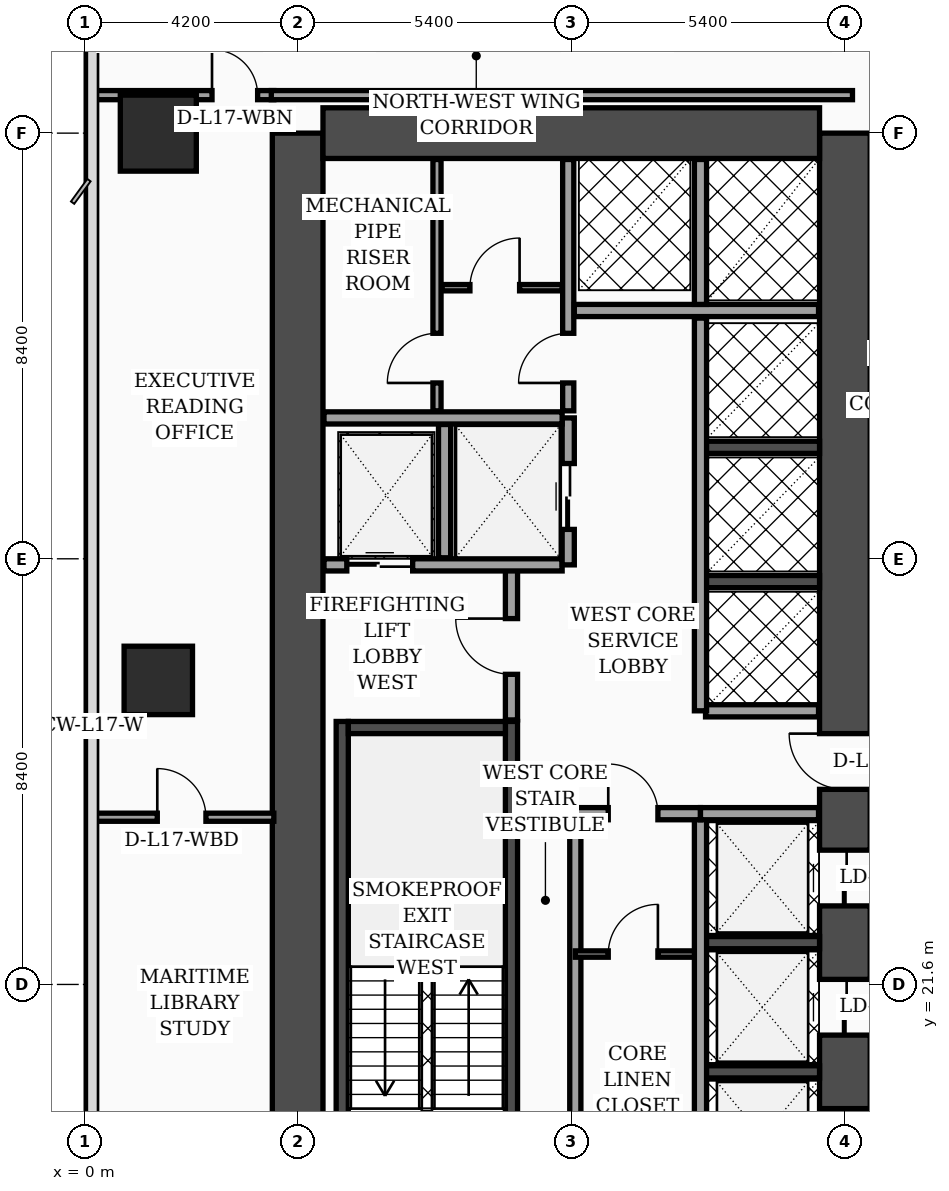
"""IFC4 building model, lengths in metres.
Left out: names, types, materials, properties, quantities, classifications, styles, units other than length and angle.
Written with IfcOpenShell. Run it as: python <this file> out.ifc"""

import sys

from ifc_helpers import new_model, si_unit, direction, frame, frame_2d, origin, origin_2d, place, context, subcontext, project, spatial, rectangle, extrude, element, fill, save


model = new_model("IFC4")
c1 = context("Model", 3, precision=1e-05, world=origin(), true_north=direction((0.0, 1.0)))
c2 = subcontext(c1, "Body", "Model", "MODEL_VIEW")
j1 = project(units=[si_unit("LENGTHUNIT", "METRE"), si_unit("PLANEANGLEUNIT", "RADIAN")], contexts=[c1])
p1 = place(None, origin())
s1 = spatial("IfcSite", under=j1, at=p1, CompositionType="ELEMENT")
p2 = place(p1, origin())
s2 = spatial("IfcBuilding", under=s1, at=p2, CompositionType="ELEMENT")
p3 = place(p2, frame((0.0, 0.0, 73.6)))
s3 = spatial("IfcBuildingStorey", under=s2, at=p3, CompositionType="ELEMENT", Elevation=73.6)
p4 = place(p3, frame((4.2, 16.8, 0.0), z_axis=(0.0, 0.0, 1.0), x_axis=(0.0, 1.0, 0.0)))
e1 = element("IfcWall", 1, at=p4, inside=s3, PredefinedType="SHEAR", context=c2, shape_type="SweptSolid", body=[
    extrude(rectangle(XDim=21.6, YDim=1.0, at=frame_2d((10.8, 0.0))), origin(), (0.0, 0.0, 1.0), 3.56),
])
p5 = place(p3, frame((15.0, 16.8, 0.0), z_axis=(0.0, 0.0, 1.0), x_axis=(0.0, 1.0, 0.0)))
e2 = element("IfcWall", 2, at=p5, inside=s3, PredefinedType="SHEAR", context=c2, shape_type="SweptSolid", body=[
    extrude(rectangle(XDim=21.6, YDim=1.0, at=frame_2d((10.8, 0.0))), origin(), (0.0, 0.0, 1.0), 3.56),
])
p6 = place(p5, frame((8.65, 0.0, 0.0)))
e3 = element("IfcOpeningElement", 3, at=p6, cuts=e2, PredefinedType="OPENING", context=c2, shape_type="SweptSolid", body=[
    extrude(rectangle(XDim=1.1, YDim=2.2, at=frame_2d((0.55, 1.1))), frame((0.0, 0.51, 0.0), z_axis=(0.0, -1.0, 0.0), x_axis=(1.0, 0.0, 0.0)), (0.0, 0.0, 1.0), 1.02),
])
p7 = place(p5, frame((1.25, 0.0, 0.0)))
e4 = element("IfcOpeningElement", 4, at=p7, cuts=e2, PredefinedType="OPENING", context=c2, shape_type="SweptSolid", body=[
    extrude(rectangle(XDim=1.1, YDim=2.2, at=frame_2d((0.55, 1.1))), frame((0.0, 0.51, 0.0), z_axis=(0.0, -1.0, 0.0), x_axis=(1.0, 0.0, 0.0)), (0.0, 0.0, 1.0), 1.02),
])
p8 = place(p5, frame((3.8, 0.0, 0.0)))
e5 = element("IfcOpeningElement", 5, at=p8, cuts=e2, PredefinedType="OPENING", context=c2, shape_type="SweptSolid", body=[
    extrude(rectangle(XDim=1.1, YDim=2.2, at=frame_2d((0.55, 1.1))), frame((0.0, 0.51, 0.0), z_axis=(0.0, -1.0, 0.0), x_axis=(1.0, 0.0, 0.0)), (0.0, 0.0, 1.0), 1.02),
])
p9 = place(p5, frame((6.35, 0.0, 0.0)))
e6 = element("IfcOpeningElement", 6, at=p9, cuts=e2, PredefinedType="OPENING", context=c2, shape_type="SweptSolid", body=[
    extrude(rectangle(XDim=1.1, YDim=2.2, at=frame_2d((0.55, 1.1))), frame((0.0, 0.51, 0.0), z_axis=(0.0, -1.0, 0.0), x_axis=(1.0, 0.0, 0.0)), (0.0, 0.0, 1.0), 1.02),
])
p10 = place(p3, frame((4.7, 38.4, 0.0), z_axis=(0.0, 0.0, 1.0), x_axis=(1.0, 0.0, 0.0)))
e7 = element("IfcWall", 7, at=p10, inside=s3, PredefinedType="SHEAR", context=c2, shape_type="SweptSolid", body=[
    extrude(rectangle(XDim=9.8, YDim=1.0, at=frame_2d((4.9, 0.0))), origin(), (0.0, 0.0, 1.0), 3.56),
])
p11 = place(p3, frame((5.08, 17.3, 0.0), z_axis=(0.0, 0.0, 1.0), x_axis=(0.0, 1.0, 0.0)))
e8 = element("IfcWall", 8, at=p11, inside=s3, PredefinedType="SOLIDWALL", context=c2, shape_type="SweptSolid", body=[
    extrude(rectangle(XDim=9.49, YDim=0.24, at=frame_2d((4.745, 0.0))), origin(), (0.0, 0.0, 1.0), 3.56),
])
p12 = place(p3, frame((8.42, 17.3, 0.0), z_axis=(0.0, 0.0, 1.0), x_axis=(0.0, 1.0, 0.0)))
e9 = element("IfcWall", 9, at=p12, inside=s3, PredefinedType="SOLIDWALL", context=c2, shape_type="SweptSolid", body=[
    extrude(rectangle(XDim=9.49, YDim=0.24, at=frame_2d((4.745, 0.0))), origin(), (0.0, 0.0, 1.0), 3.56),
])
p13 = place(p12, frame((0.35, 0.0, 0.0)))
e10 = element("IfcOpeningElement", 10, at=p13, cuts=e9, PredefinedType="OPENING", context=c2, shape_type="SweptSolid", body=[
    extrude(rectangle(XDim=1.15, YDim=2.2, at=frame_2d((0.575, 1.1))), frame((0.0, 0.13, 0.0), z_axis=(0.0, -1.0, 0.0), x_axis=(1.0, 0.0, 0.0)), (0.0, 0.0, 1.0), 0.26),
])
p14 = place(p3, frame((5.2, 26.67, 0.0), z_axis=(0.0, 0.0, 1.0), x_axis=(1.0, 0.0, 0.0)))
e11 = element("IfcWall", 11, at=p14, inside=s3, PredefinedType="SOLIDWALL", context=c2, shape_type="SweptSolid", body=[
    extrude(rectangle(XDim=3.1, YDim=0.24, at=frame_2d((1.55, 0.0))), origin(), (0.0, 0.0, 1.0), 3.56),
])
for number, where, z_axis, x_axis in (
    (12, (12.18, 19.875, 0.0), (0.0, 0.0, 1.0), (1.0, 0.0, 0.0)),
    (13, (12.18, 22.425, 0.0), (0.0, 0.0, 1.0), (1.0, 0.0, 0.0)),
    (14, (12.18, 29.55, 0.0), (0.0, 0.0, 1.0), (1.0, 0.0, 0.0)),
    (15, (12.18, 32.2, 0.0), (0.0, 0.0, 1.0), (1.0, 0.0, 0.0)),
):
    element("IfcWall", number, at=place(p3, frame(where, z_axis=z_axis, x_axis=x_axis)), inside=s3, PredefinedType="SOLIDWALL", context=c2, shape_type="SweptSolid", body=[
        extrude(rectangle(XDim=2.32, YDim=0.24, at=frame_2d((1.16, 0.0))), origin(), (0.0, 0.0, 1.0), 3.56),
    ])
p15 = place(p3, frame((1.45, 27.6, 0.0), z_axis=(0.0, 0.0, 1.0), x_axis=(1.0, 0.0, 0.0)))
e16 = element("IfcColumn", 16, at=p15, inside=s3, PredefinedType="COLUMN", context=c2, shape_type="SweptSolid", body=[
    extrude(rectangle(XDim=1.35, YDim=1.35, at=origin_2d()), origin(), (0.0, 0.0, 1.0), 3.56),
])
p16 = place(p3, frame((1.45, 38.4, 0.0), z_axis=(0.0, 0.0, 1.0), x_axis=(1.0, 0.0, 0.0)))
e17 = element("IfcColumn", 17, at=p16, inside=s3, PredefinedType="COLUMN", context=c2, shape_type="SweptSolid", body=[
    extrude(rectangle(XDim=1.5, YDim=1.5, at=origin_2d()), origin(), (0.0, 0.0, 1.0), 3.56),
])
p17 = place(p3, frame((8.42, 26.82, 0.0), z_axis=(0.0, 0.0, 1.0), x_axis=(0.0, 1.0, 0.0)))
e18 = element("IfcWall", 18, at=p17, inside=s3, PredefinedType="SOLIDWALL", context=c2, shape_type="SweptSolid", body=[
    extrude(rectangle(XDim=3.0, YDim=0.24, at=frame_2d((1.5, 0.0))), origin(), (0.0, 0.0, 1.0), 3.56),
])
p18 = place(p17, frame((0.9, 0.0, 0.0)))
e19 = element("IfcOpeningElement", 19, at=p18, cuts=e18, PredefinedType="OPENING", context=c2, shape_type="SweptSolid", body=[
    extrude(rectangle(XDim=1.1, YDim=2.2, at=frame_2d((0.55, 1.1))), frame((0.0, 0.13, 0.0), z_axis=(0.0, -1.0, 0.0), x_axis=(1.0, 0.0, 0.0)), (0.0, 0.0, 1.0), 0.26),
])
p19 = place(p3, frame((4.72, 29.88, 0.0), z_axis=(0.0, 0.0, 1.0), x_axis=(1.0, 0.0, 0.0)))
e20 = element("IfcWall", 20, at=p19, inside=s3, PredefinedType="SOLIDWALL", context=c2, shape_type="SweptSolid", body=[
    extrude(rectangle(XDim=4.7, YDim=0.24, at=frame_2d((2.35, 0.0))), origin(), (0.0, 0.0, 1.0), 3.56),
])
p20 = place(p19, frame((0.45, 0.0, 0.0)))
e21 = element("IfcOpeningElement", 21, at=p20, cuts=e20, PredefinedType="OPENING", context=c2, shape_type="SweptSolid", body=[
    extrude(rectangle(XDim=1.3, YDim=2.35, at=frame_2d((0.65, 1.175))), frame((0.0, 0.13, 0.0), z_axis=(0.0, -1.0, 0.0), x_axis=(1.0, 0.0, 0.0)), (0.0, 0.0, 1.0), 0.26),
])
p21 = place(p3, frame((7.1, 30.02, 0.0), z_axis=(0.0, 0.0, 1.0), x_axis=(0.0, 1.0, 0.0)))
e22 = element("IfcWall", 22, at=p21, inside=s3, PredefinedType="SOLIDWALL", context=c2, shape_type="SweptSolid", body=[
    extrude(rectangle(XDim=2.63, YDim=0.24, at=frame_2d((1.315, 0.0))), origin(), (0.0, 0.0, 1.0), 3.56),
])
p22 = place(p3, frame((9.54, 29.88, 0.0), z_axis=(0.0, 0.0, 1.0), x_axis=(0.0, 1.0, 0.0)))
e23 = element("IfcWall", 23, at=p22, inside=s3, PredefinedType="SOLIDWALL", context=c2, shape_type="SweptSolid", body=[
    extrude(rectangle(XDim=2.9, YDim=0.24, at=frame_2d((1.45, 0.0))), origin(), (0.0, 0.0, 1.0), 3.56),
])
p23 = place(p22, frame((0.7, 0.0, 0.0)))
e24 = element("IfcOpeningElement", 24, at=p23, cuts=e23, PredefinedType="OPENING", context=c2, shape_type="SweptSolid", body=[
    extrude(rectangle(XDim=1.3, YDim=2.35, at=frame_2d((0.65, 1.175))), frame((0.0, 0.13, 0.0), z_axis=(0.0, -1.0, 0.0), x_axis=(1.0, 0.0, 0.0)), (0.0, 0.0, 1.0), 0.26),
])
p24 = place(p3, frame((4.72, 32.78, 0.0), z_axis=(0.0, 0.0, 1.0), x_axis=(1.0, 0.0, 0.0)))
e25 = element("IfcWall", 25, at=p24, inside=s3, PredefinedType="SOLIDWALL", context=c2, shape_type="SweptSolid", body=[
    extrude(rectangle(XDim=4.7, YDim=0.24, at=frame_2d((2.35, 0.0))), origin(), (0.0, 0.0, 1.0), 3.56),
])
p25 = place(p3, frame((9.68, 17.32, 0.0), z_axis=(0.0, 0.0, 1.0), x_axis=(0.0, 1.0, 0.0)))
e26 = element("IfcWall", 26, at=p25, inside=s3, PredefinedType="SOLIDWALL", context=c2, shape_type="SweptSolid", body=[
    extrude(rectangle(XDim=7.68, YDim=0.22, at=frame_2d((3.84, 0.0))), origin(), (0.0, 0.0, 1.0), 3.56),
])
p26 = place(p3, frame((6.95, 32.92, 0.0), z_axis=(0.0, 0.0, 1.0), x_axis=(0.0, 1.0, 0.0)))
e27 = element("IfcWall", 27, at=p26, inside=s3, PredefinedType="PARTITIONING", context=c2, shape_type="SweptSolid", body=[
    extrude(rectangle(XDim=4.96, YDim=0.16, at=frame_2d((2.48, 0.0))), origin(), (0.0, 0.0, 1.0), 3.56),
])
p27 = place(p26, frame((0.55, 0.0, 0.0)))
e28 = element("IfcOpeningElement", 28, at=p27, cuts=e27, PredefinedType="OPENING", context=c2, shape_type="SweptSolid", body=[
    extrude(rectangle(XDim=0.98, YDim=2.15, at=frame_2d((0.49, 1.075))), frame((0.0, 0.09, 0.0), z_axis=(0.0, -1.0, 0.0), x_axis=(1.0, 0.0, 0.0)), (0.0, 0.0, 1.0), 0.18),
])
p28 = place(p3, frame((7.05, 35.35, 0.0), z_axis=(0.0, 0.0, 1.0), x_axis=(1.0, 0.0, 0.0)))
e29 = element("IfcWall", 29, at=p28, inside=s3, PredefinedType="PARTITIONING", context=c2, shape_type="SweptSolid", body=[
    extrude(rectangle(XDim=2.37, YDim=0.125, at=frame_2d((1.185, 0.0))), origin(), (0.0, 0.0, 1.0), 3.56),
])
p29 = place(p28, frame((0.55, 0.0, 0.0)))
e30 = element("IfcOpeningElement", 30, at=p29, cuts=e29, PredefinedType="OPENING", context=c2, shape_type="SweptSolid", body=[
    extrude(rectangle(XDim=0.98, YDim=2.15, at=frame_2d((0.49, 1.075))), frame((0.0, 0.073, 0.0), z_axis=(0.0, -1.0, 0.0), x_axis=(1.0, 0.0, 0.0)), (0.0, 0.0, 1.0), 0.145),
])
p30 = place(p3, frame((9.54, 32.92, 0.0), z_axis=(0.0, 0.0, 1.0), x_axis=(0.0, 1.0, 0.0)))
e31 = element("IfcWall", 31, at=p30, inside=s3, PredefinedType="SOLIDWALL", context=c2, shape_type="SweptSolid", body=[
    extrude(rectangle(XDim=4.96, YDim=0.22, at=frame_2d((2.48, 0.0))), origin(), (0.0, 0.0, 1.0), 3.56),
])
p31 = place(p30, frame((0.55, 0.0, 0.0)))
e32 = element("IfcOpeningElement", 32, at=p31, cuts=e31, PredefinedType="OPENING", context=c2, shape_type="SweptSolid", body=[
    extrude(rectangle(XDim=0.98, YDim=2.15, at=frame_2d((0.49, 1.075))), frame((0.0, 0.12, 0.0), z_axis=(0.0, -1.0, 0.0), x_axis=(1.0, 0.0, 0.0)), (0.0, 0.0, 1.0), 0.24),
])
p32 = place(p3, frame((9.68, 22.2, 0.0), z_axis=(0.0, 0.0, 1.0), x_axis=(1.0, 0.0, 0.0)))
e33 = element("IfcWall", 33, at=p32, inside=s3, PredefinedType="PARTITIONING", context=c2, shape_type="SweptSolid", body=[
    extrude(rectangle(XDim=2.47, YDim=0.125, at=frame_2d((1.235, 0.0))), origin(), (0.0, 0.0, 1.0), 3.56),
])
p33 = place(p32, frame((0.65, 0.0, 0.0)))
e34 = element("IfcOpeningElement", 34, at=p33, cuts=e33, PredefinedType="OPENING", context=c2, shape_type="SweptSolid", body=[
    extrude(rectangle(XDim=0.98, YDim=2.15, at=frame_2d((0.49, 1.075))), frame((0.0, 0.073, 0.0), z_axis=(0.0, -1.0, 0.0), x_axis=(1.0, 0.0, 0.0)), (0.0, 0.0, 1.0), 0.145),
])
p34 = place(p3, frame((12.15, 17.32, 0.0), z_axis=(0.0, 0.0, 1.0), x_axis=(0.0, 1.0, 0.0)))
e35 = element("IfcWall", 35, at=p34, inside=s3, PredefinedType="SOLIDWALL", context=c2, shape_type="SweptSolid", body=[
    extrude(rectangle(XDim=7.65, YDim=0.24, at=frame_2d((3.825, 0.0))), origin(), (0.0, 0.0, 1.0), 3.56),
])
p35 = place(p3, frame((9.68, 24.97, 0.0), z_axis=(0.0, 0.0, 1.0), x_axis=(1.0, 0.0, 0.0)))
e36 = element("IfcWall", 36, at=p35, inside=s3, PredefinedType="SOLIDWALL", context=c2, shape_type="SweptSolid", body=[
    extrude(rectangle(XDim=2.47, YDim=0.24, at=frame_2d((1.235, 0.0))), origin(), (0.0, 0.0, 1.0), 3.56),
])
p36 = place(p35, frame((0.65, 0.0, 0.0)))
e37 = element("IfcOpeningElement", 37, at=p36, cuts=e36, PredefinedType="OPENING", context=c2, shape_type="SweptSolid", body=[
    extrude(rectangle(XDim=0.98, YDim=2.15, at=frame_2d((0.49, 1.075))), frame((0.0, 0.13, 0.0), z_axis=(0.0, -1.0, 0.0), x_axis=(1.0, 0.0, 0.0)), (0.0, 0.0, 1.0), 0.26),
])
p37 = place(p3, frame((12.15, 24.97, 0.0), z_axis=(0.0, 0.0, 1.0), x_axis=(1.0, 0.0, 0.0)))
e38 = element("IfcWall", 38, at=p37, inside=s3, PredefinedType="SOLIDWALL", context=c2, shape_type="SweptSolid", body=[
    extrude(rectangle(XDim=2.33, YDim=0.24, at=frame_2d((1.165, 0.0))), origin(), (0.0, 0.0, 1.0), 2.84),
])
p38 = place(p3, frame((12.25, 27.0, 0.0), z_axis=(0.0, 0.0, 1.0), x_axis=(1.0, 0.0, 0.0)))
e39 = element("IfcWall", 39, at=p38, inside=s3, PredefinedType="SOLIDWALL", context=c2, shape_type="SweptSolid", body=[
    extrude(rectangle(XDim=2.23, YDim=0.24, at=frame_2d((1.115, 0.0))), origin(), (0.0, 0.0, 1.0), 3.56),
])
p39 = place(p3, frame((12.15, 27.0, 0.0), z_axis=(0.0, 0.0, 1.0), x_axis=(0.0, 1.0, 0.0)))
e40 = element("IfcWall", 40, at=p39, inside=s3, PredefinedType="SOLIDWALL", context=c2, shape_type="SweptSolid", body=[
    extrude(rectangle(XDim=7.75, YDim=0.24, at=frame_2d((3.875, 0.0))), origin(), (0.0, 0.0, 1.0), 3.56),
])
p40 = place(p3, frame((9.66, 34.9, 0.0), z_axis=(0.0, 0.0, 1.0), x_axis=(1.0, 0.0, 0.0)))
e41 = element("IfcWall", 41, at=p40, inside=s3, PredefinedType="SOLIDWALL", context=c2, shape_type="SweptSolid", body=[
    extrude(rectangle(XDim=4.82, YDim=0.24, at=frame_2d((2.41, 0.0))), origin(), (0.0, 0.0, 1.0), 3.56),
])
p41 = place(p3, frame((12.15, 35.02, 0.0), z_axis=(0.0, 0.0, 1.0), x_axis=(0.0, 1.0, 0.0)))
e42 = element("IfcWall", 42, at=p41, inside=s3, PredefinedType="SOLIDWALL", context=c2, shape_type="SweptSolid", body=[
    extrude(rectangle(XDim=2.86, YDim=0.24, at=frame_2d((1.43, 0.0))), origin(), (0.0, 0.0, 1.0), 3.56),
])
p42 = place(p3, frame((0.08, 24.9, 0.0), z_axis=(0.0, 0.0, 1.0), x_axis=(1.0, 0.0, 0.0)))
e43 = element("IfcWall", 43, at=p42, inside=s3, PredefinedType="PARTITIONING", context=c2, shape_type="SweptSolid", body=[
    extrude(rectangle(XDim=3.65, YDim=0.16, at=frame_2d((1.825, 0.0))), origin(), (0.0, 0.0, 1.0), 3.04),
])
p43 = place(p42, frame((1.35, 0.0, 0.0)))
e44 = element("IfcOpeningElement", 44, at=p43, cuts=e43, PredefinedType="OPENING", context=c2, shape_type="SweptSolid", body=[
    extrude(rectangle(XDim=0.96, YDim=2.2, at=frame_2d((0.48, 1.1))), frame((0.0, 0.09, 0.0), z_axis=(0.0, -1.0, 0.0), x_axis=(1.0, 0.0, 0.0)), (0.0, 0.0, 1.0), 0.18),
])
p44 = place(p3, frame((0.08, 39.15, 0.0), z_axis=(0.0, 0.0, 1.0), x_axis=(1.0, 0.0, 0.0)))
e45 = element("IfcWall", 45, at=p44, inside=s3, PredefinedType="PARTITIONING", context=c2, shape_type="SweptSolid", body=[
    extrude(rectangle(XDim=3.65, YDim=0.18, at=frame_2d((1.825, 0.0))), origin(), (0.0, 0.0, 1.0), 2.84),
])
p45 = place(p44, frame((2.43, 0.0, 0.0)))
e46 = element("IfcOpeningElement", 46, at=p45, cuts=e45, PredefinedType="OPENING", context=c2, shape_type="SweptSolid", body=[
    extrude(rectangle(XDim=0.9, YDim=2.15, at=frame_2d((0.45, 1.075))), frame((0.0, 0.1, 0.0), z_axis=(0.0, -1.0, 0.0), x_axis=(1.0, 0.0, 0.0)), (0.0, 0.0, 1.0), 0.2),
])
p46 = place(p3, frame((3.68, 39.15, 0.0), z_axis=(0.0, 0.0, 1.0), x_axis=(1.0, 0.0, 0.0)))
e47 = element("IfcWall", 47, at=p46, inside=s3, PredefinedType="PARTITIONING", context=c2, shape_type="SweptSolid", body=[
    extrude(rectangle(XDim=11.47, YDim=0.18, at=frame_2d((5.735, 0.0))), origin(), (0.0, 0.0, 1.0), 2.84),
])
p47 = place(p18, origin())
e48 = element("IfcDoor", 48, at=p47, inside=s3, OperationType="SINGLE_SWING_RIGHT", PredefinedType="DOOR", context=c2, shape_type="SweptSolid", body=[
    extrude(rectangle(XDim=1.1, YDim=2.2, at=frame_2d((0.55, 1.1))), frame((0.0, 0.025, 0.0), z_axis=(0.0, -1.0, 0.0), x_axis=(1.0, 0.0, 0.0)), (0.0, 0.0, 1.0), 0.05),
])
fill(e19, e48)
p48 = place(p20, origin())
e49 = element("IfcDoor", 49, at=p48, inside=s3, OperationType="DOUBLE_DOOR_SLIDING", PredefinedType="DOOR", context=c2, shape_type="SweptSolid", body=[
    extrude(rectangle(XDim=1.3, YDim=2.35, at=frame_2d((0.65, 1.175))), frame((0.0, 0.025, 0.0), z_axis=(0.0, -1.0, 0.0), x_axis=(1.0, 0.0, 0.0)), (0.0, 0.0, 1.0), 0.05),
])
fill(e21, e49)
p49 = place(p23, origin())
e50 = element("IfcDoor", 50, at=p49, inside=s3, OperationType="DOUBLE_DOOR_SLIDING", PredefinedType="DOOR", context=c2, shape_type="SweptSolid", body=[
    extrude(rectangle(XDim=1.3, YDim=2.35, at=frame_2d((0.65, 1.175))), frame((0.0, 0.025, 0.0), z_axis=(0.0, -1.0, 0.0), x_axis=(1.0, 0.0, 0.0)), (0.0, 0.0, 1.0), 0.05),
])
fill(e24, e50)
p50 = place(p27, origin())
e51 = element("IfcDoor", 51, at=p50, inside=s3, OperationType="SINGLE_SWING_LEFT", PredefinedType="DOOR", context=c2, shape_type="SweptSolid", body=[
    extrude(rectangle(XDim=0.98, YDim=2.15, at=frame_2d((0.49, 1.075))), frame((0.0, 0.025, 0.0), z_axis=(0.0, -1.0, 0.0), x_axis=(1.0, 0.0, 0.0)), (0.0, 0.0, 1.0), 0.05),
])
fill(e28, e51)
p51 = place(p29, origin())
e52 = element("IfcDoor", 52, at=p51, inside=s3, OperationType="SINGLE_SWING_RIGHT", PredefinedType="DOOR", context=c2, shape_type="SweptSolid", body=[
    extrude(rectangle(XDim=0.98, YDim=2.15, at=frame_2d((0.49, 1.075))), frame((0.0, 0.025, 0.0), z_axis=(0.0, -1.0, 0.0), x_axis=(1.0, 0.0, 0.0)), (0.0, 0.0, 1.0), 0.05),
])
fill(e30, e52)
p52 = place(p31, origin())
e53 = element("IfcDoor", 53, at=p52, inside=s3, OperationType="SINGLE_SWING_LEFT", PredefinedType="DOOR", context=c2, shape_type="SweptSolid", body=[
    extrude(rectangle(XDim=0.98, YDim=2.15, at=frame_2d((0.49, 1.075))), frame((0.0, 0.025, 0.0), z_axis=(0.0, -1.0, 0.0), x_axis=(1.0, 0.0, 0.0)), (0.0, 0.0, 1.0), 0.05),
])
fill(e32, e53)
p53 = place(p33, origin())
e54 = element("IfcDoor", 54, at=p53, inside=s3, OperationType="SINGLE_SWING_RIGHT", PredefinedType="DOOR", context=c2, shape_type="SweptSolid", body=[
    extrude(rectangle(XDim=0.98, YDim=2.15, at=frame_2d((0.49, 1.075))), frame((0.0, 0.025, 0.0), z_axis=(0.0, -1.0, 0.0), x_axis=(1.0, 0.0, 0.0)), (0.0, 0.0, 1.0), 0.05),
])
fill(e34, e54)
p54 = place(p36, origin())
e55 = element("IfcDoor", 55, at=p54, inside=s3, OperationType="SINGLE_SWING_LEFT", PredefinedType="DOOR", context=c2, shape_type="SweptSolid", body=[
    extrude(rectangle(XDim=0.98, YDim=2.15, at=frame_2d((0.49, 1.075))), frame((0.0, 0.025, 0.0), z_axis=(0.0, -1.0, 0.0), x_axis=(1.0, 0.0, 0.0)), (0.0, 0.0, 1.0), 0.05),
])
fill(e37, e55)
p55 = place(p43, origin())
e56 = element("IfcDoor", 56, at=p55, inside=s3, OperationType="SINGLE_SWING_LEFT", PredefinedType="DOOR", context=c2, shape_type="SweptSolid", body=[
    extrude(rectangle(XDim=0.96, YDim=2.2, at=frame_2d((0.48, 1.1))), frame((0.0, 0.025, 0.0), z_axis=(0.0, -1.0, 0.0), x_axis=(1.0, 0.0, 0.0)), (0.0, 0.0, 1.0), 0.05),
])
fill(e44, e56)
p56 = place(p45, origin())
e57 = element("IfcDoor", 57, at=p56, inside=s3, OperationType="SINGLE_SWING_LEFT", PredefinedType="DOOR", context=c2, shape_type="SweptSolid", body=[
    extrude(rectangle(XDim=0.9, YDim=2.15, at=frame_2d((0.45, 1.075))), frame((0.0, 0.025, 0.0), z_axis=(0.0, -1.0, 0.0), x_axis=(1.0, 0.0, 0.0)), (0.0, 0.0, 1.0), 0.05),
])
fill(e46, e57)
p57 = place(p6, origin())
e58 = element("IfcDoor", 58, at=p57, inside=s3, OperationType="SINGLE_SWING_RIGHT", PredefinedType="DOOR", context=c2, shape_type="SweptSolid", body=[
    extrude(rectangle(XDim=1.1, YDim=2.2, at=frame_2d((0.55, 1.1))), frame((0.0, 0.025, 0.0), z_axis=(0.0, -1.0, 0.0), x_axis=(1.0, 0.0, 0.0)), (0.0, 0.0, 1.0), 0.05),
])
fill(e3, e58)
p58 = place(p7, origin())
e59 = element("IfcDoor", 59, at=p58, inside=s3, OperationType="DOUBLE_DOOR_SLIDING", PredefinedType="DOOR", context=c2, shape_type="SweptSolid", body=[
    extrude(rectangle(XDim=1.1, YDim=2.2, at=frame_2d((0.55, 1.1))), frame((0.0, 0.025, 0.0), z_axis=(0.0, -1.0, 0.0), x_axis=(1.0, 0.0, 0.0)), (0.0, 0.0, 1.0), 0.05),
])
fill(e4, e59)
p59 = place(p8, origin())
e60 = element("IfcDoor", 60, at=p59, inside=s3, OperationType="DOUBLE_DOOR_SLIDING", PredefinedType="DOOR", context=c2, shape_type="SweptSolid", body=[
    extrude(rectangle(XDim=1.1, YDim=2.2, at=frame_2d((0.55, 1.1))), frame((0.0, 0.025, 0.0), z_axis=(0.0, -1.0, 0.0), x_axis=(1.0, 0.0, 0.0)), (0.0, 0.0, 1.0), 0.05),
])
fill(e5, e60)
p60 = place(p9, origin())
e61 = element("IfcDoor", 61, at=p60, inside=s3, OperationType="DOUBLE_DOOR_SLIDING", PredefinedType="DOOR", context=c2, shape_type="SweptSolid", body=[
    extrude(rectangle(XDim=1.1, YDim=2.2, at=frame_2d((0.55, 1.1))), frame((0.0, 0.025, 0.0), z_axis=(0.0, -1.0, 0.0), x_axis=(1.0, 0.0, 0.0)), (0.0, 0.0, 1.0), 0.05),
])
fill(e6, e61)
save(model, sys.argv[1])
